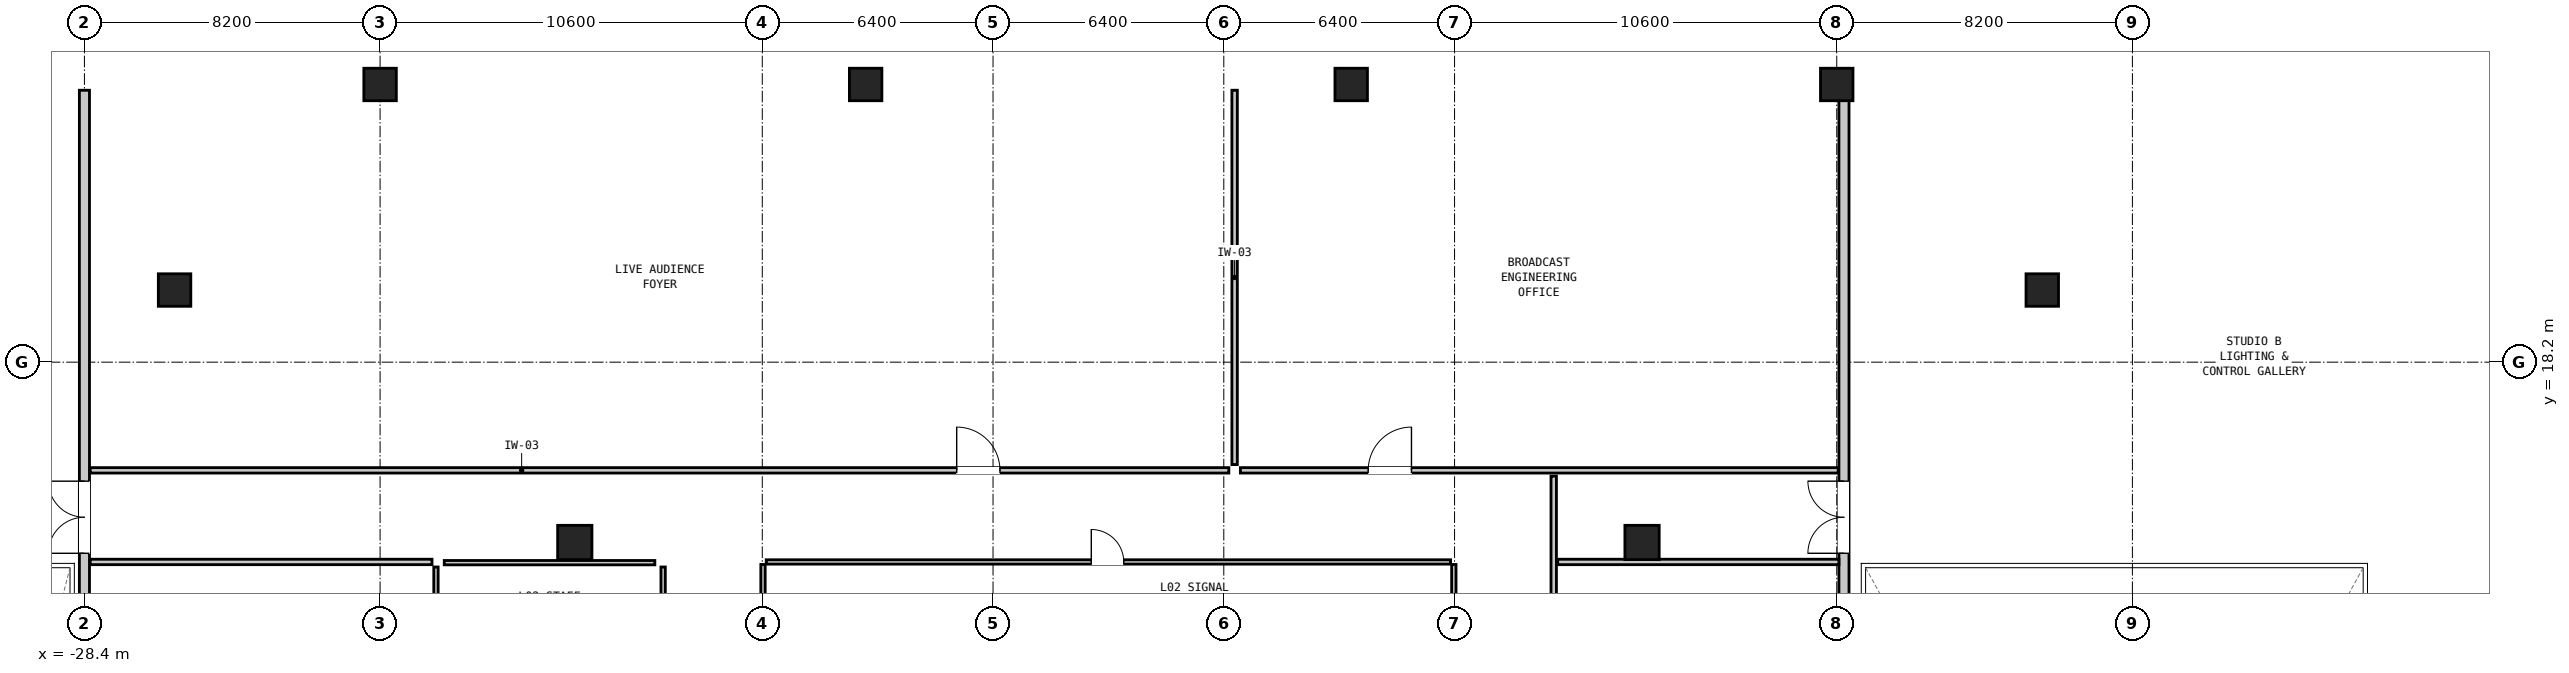
"""IFC4 building model, lengths in metres.
Left out: names, types, materials, properties, quantities, classifications, styles, units other than length and angle.
Written with IfcOpenShell. Run it as: python <this file> out.ifc"""

import sys

from ifc_helpers import new_model, si_unit, direction, frame, frame_2d, origin, origin_2d, place, context, subcontext, project, spatial, rectangle, hollow_rectangle, extrude, element, fill, save


model = new_model("IFC4")
c1 = context("Model", 3, precision=1e-05, world=origin(), true_north=direction((0.0, 1.0)))
c2 = subcontext(c1, "Body", "Model", "MODEL_VIEW")
j1 = project(units=[si_unit("LENGTHUNIT", "METRE"), si_unit("PLANEANGLEUNIT", "RADIAN")], contexts=[c1])
p1 = place(None, origin())
s1 = spatial("IfcSite", under=j1, at=p1, CompositionType="ELEMENT")
p2 = place(p1, origin())
s2 = spatial("IfcBuilding", under=s1, at=p2, CompositionType="ELEMENT")
p3 = place(p2, frame((0.0, 0.0, 9.3)))
s3 = spatial("IfcBuildingStorey", under=s2, at=p3, CompositionType="ELEMENT", Elevation=9.3)
for number, where, z_axis, x_axis in (
    (1, (-14.8, 13.2, 0.0), (0.0, 0.0, 1.0), (1.0, 0.0, 0.0)),
    (2, (14.8, 13.2, 0.0), (0.0, 0.0, 1.0), (1.0, 0.0, 0.0)),
):
    element("IfcColumn", number, at=place(p3, frame(where, z_axis=z_axis, x_axis=x_axis)), inside=s3, PredefinedType="COLUMN", context=c2, shape_type="SweptSolid", body=[
        extrude(hollow_rectangle(XDim=0.95, YDim=0.95, WallThickness=0.06, at=origin_2d()), origin(), (0.0, 0.0, 1.0), 4.2),
    ])
for number, where, z_axis, x_axis in (
    (3, (25.9, 20.2, 0.0), (0.0, 0.0, 1.0), (0.0, 1.0, 0.0)),
    (4, (20.2, 25.9, 0.0), (0.0, 0.0, 1.0), (1.0, 0.0, 0.0)),
    (5, (6.733, 25.9, 0.0), (0.0, 0.0, 1.0), (1.0, 0.0, 0.0)),
    (6, (-6.733, 25.9, 0.0), (0.0, 0.0, 1.0), (1.0, 0.0, 0.0)),
    (7, (-20.2, 25.9, 0.0), (0.0, 0.0, 1.0), (1.0, 0.0, 0.0)),
    (8, (-25.9, 20.2, 0.0), (0.0, 0.0, 1.0), (0.0, 1.0, 0.0)),
):
    element("IfcColumn", number, at=place(p3, frame(where, z_axis=z_axis, x_axis=x_axis)), inside=s3, PredefinedType="COLUMN", context=c2, shape_type="SweptSolid", body=[
        extrude(hollow_rectangle(XDim=0.9, YDim=0.9, WallThickness=0.055, at=origin_2d()), origin(), (0.0, 0.0, 1.0), 4.2),
    ])
p4 = place(p3, frame((-18.42, 12.64, 0.0), z_axis=(0.0, 0.0, 1.0), x_axis=(1.0, 0.0, 0.0)))
e9 = element("IfcWall", 9, at=p4, inside=s3, PredefinedType="PARTITIONING", context=c2, shape_type="SweptSolid", body=[
    extrude(rectangle(XDim=5.84, YDim=0.12, at=frame_2d((2.92, 0.0))), origin(), (0.0, 0.0, 1.0), 3.88),
])
p5 = place(p3, frame((-18.65, 6.91, 0.0), z_axis=(0.0, 0.0, 1.0), x_axis=(0.0, 1.0, 0.0)))
e10 = element("IfcWall", 10, at=p5, inside=s3, PredefinedType="PARTITIONING", context=c2, shape_type="SweptSolid", body=[
    extrude(rectangle(XDim=5.61, YDim=0.12, at=frame_2d((2.805, 0.0))), origin(), (0.0, 0.0, 1.0), 3.88),
])
p6 = place(p3, frame((-12.35, 6.91, 0.0), z_axis=(0.0, 0.0, 1.0), x_axis=(0.0, 1.0, 0.0)))
e11 = element("IfcWall", 11, at=p6, inside=s3, PredefinedType="PARTITIONING", context=c2, shape_type="SweptSolid", body=[
    extrude(rectangle(XDim=5.61, YDim=0.12, at=frame_2d((2.805, 0.0))), origin(), (0.0, 0.0, 1.0), 3.88),
])
p7 = place(p6, frame((0.759, 0.0, 0.0)))
e12 = element("IfcOpeningElement", 12, at=p7, cuts=e11, PredefinedType="OPENING", context=c2, shape_type="SweptSolid", body=[
    extrude(rectangle(XDim=0.95, YDim=2.1, at=frame_2d((0.475, 1.05))), frame((0.0, 0.072, 0.0), z_axis=(0.0, -1.0, 0.0), x_axis=(1.0, 0.0, 0.0)), (0.0, 0.0, 1.0), 0.144),
])
p8 = place(p6, frame((3.676, 0.0, 0.0)))
e13 = element("IfcOpeningElement", 13, at=p8, cuts=e11, PredefinedType="OPENING", context=c2, shape_type="SweptSolid", body=[
    extrude(rectangle(XDim=0.92, YDim=2.1, at=frame_2d((0.46, 1.05))), frame((0.0, 0.072, 0.0), z_axis=(0.0, -1.0, 0.0), x_axis=(1.0, 0.0, 0.0)), (0.0, 0.0, 1.0), 0.144),
])
p9 = place(p3, frame((-28.4, -25.74, 0.0), z_axis=(0.0, 0.0, 1.0), x_axis=(0.0, 1.0, 0.0)))
e14 = element("IfcWall", 14, at=p9, inside=s3, PredefinedType="MOVABLE", context=c2, shape_type="SweptSolid", body=[
    extrude(rectangle(XDim=51.48, YDim=0.28, at=frame_2d((25.74, 0.0))), origin(), (0.0, 0.0, 1.0), 3.88),
])
p10 = place(p9, frame((11.149, 0.0, 0.0)))
e15 = element("IfcOpeningElement", 15, at=p10, cuts=e14, PredefinedType="OPENING", context=c2, shape_type="SweptSolid", body=[
    extrude(rectangle(XDim=2.0, YDim=2.14, at=frame_2d((1.0, 1.07))), frame((0.0, 0.152, 0.0), z_axis=(0.0, -1.0, 0.0), x_axis=(1.0, 0.0, 0.0)), (0.0, 0.0, 1.0), 0.304),
])
p11 = place(p9, frame((38.64, 0.0, 0.0)))
e16 = element("IfcOpeningElement", 16, at=p11, cuts=e14, PredefinedType="OPENING", context=c2, shape_type="SweptSolid", body=[
    extrude(rectangle(XDim=2.0, YDim=2.14, at=frame_2d((1.0, 1.07))), frame((0.0, 0.152, 0.0), z_axis=(0.0, -1.0, 0.0), x_axis=(1.0, 0.0, 0.0)), (0.0, 0.0, 1.0), 0.304),
])
p12 = place(p3, frame((20.4, -25.74, 0.0), z_axis=(0.0, 0.0, 1.0), x_axis=(0.0, 1.0, 0.0)))
e17 = element("IfcWall", 17, at=p12, inside=s3, PredefinedType="MOVABLE", context=c2, shape_type="SweptSolid", body=[
    extrude(rectangle(XDim=51.48, YDim=0.28, at=frame_2d((25.74, 0.0))), origin(), (0.0, 0.0, 1.0), 2.933),
])
p13 = place(p12, frame((11.149, 0.0, 0.0)))
e18 = element("IfcOpeningElement", 18, at=p13, cuts=e17, PredefinedType="OPENING", context=c2, shape_type="SweptSolid", body=[
    extrude(rectangle(XDim=2.0, YDim=2.14, at=frame_2d((1.0, 1.07))), frame((0.0, 0.152, 0.0), z_axis=(0.0, -1.0, 0.0), x_axis=(1.0, 0.0, 0.0)), (0.0, 0.0, 1.0), 0.304),
])
p14 = place(p12, frame((38.64, 0.0, 0.0)))
e19 = element("IfcOpeningElement", 19, at=p14, cuts=e17, PredefinedType="OPENING", context=c2, shape_type="SweptSolid", body=[
    extrude(rectangle(XDim=2.0, YDim=2.14, at=frame_2d((1.0, 1.07))), frame((0.0, 0.152, 0.0), z_axis=(0.0, -1.0, 0.0), x_axis=(1.0, 0.0, 0.0)), (0.0, 0.0, 1.0), 0.304),
])
p15 = place(p3, frame((-28.24, 15.2, 0.0), z_axis=(0.0, 0.0, 1.0), x_axis=(1.0, 0.0, 0.0)))
e20 = element("IfcWall", 20, at=p15, inside=s3, PredefinedType="PARTITIONING", context=c2, shape_type="SweptSolid", body=[
    extrude(rectangle(XDim=31.58, YDim=0.15, at=frame_2d((15.79, 0.0))), origin(), (0.0, 0.0, 1.0), 3.88),
])
p16 = place(p15, frame((24.032, 0.0, 0.0)))
e21 = element("IfcOpeningElement", 21, at=p16, cuts=e20, PredefinedType="OPENING", context=c2, shape_type="SweptSolid", body=[
    extrude(rectangle(XDim=1.2, YDim=2.1, at=frame_2d((0.6, 1.05))), frame((0.0, 0.087, 0.0), z_axis=(0.0, -1.0, 0.0), x_axis=(1.0, 0.0, 0.0)), (0.0, 0.0, 1.0), 0.174),
])
p17 = place(p3, frame((3.66, 15.2, 0.0), z_axis=(0.0, 0.0, 1.0), x_axis=(1.0, 0.0, 0.0)))
e22 = element("IfcWall", 22, at=p17, inside=s3, PredefinedType="PARTITIONING", context=c2, shape_type="SweptSolid", body=[
    extrude(rectangle(XDim=16.58, YDim=0.15, at=frame_2d((8.29, 0.0))), origin(), (0.0, 0.0, 1.0), 3.88),
])
p18 = place(p17, frame((3.545, 0.0, 0.0)))
e23 = element("IfcOpeningElement", 23, at=p18, cuts=e22, PredefinedType="OPENING", context=c2, shape_type="SweptSolid", body=[
    extrude(rectangle(XDim=1.2, YDim=2.1, at=frame_2d((0.6, 1.05))), frame((0.0, 0.087, 0.0), z_axis=(0.0, -1.0, 0.0), x_axis=(1.0, 0.0, 0.0)), (0.0, 0.0, 1.0), 0.174),
])
p19 = place(p3, frame((3.5, 15.36, 0.0), z_axis=(0.0, 0.0, 1.0), x_axis=(0.0, 1.0, 0.0)))
e24 = element("IfcWall", 24, at=p19, inside=s3, PredefinedType="PARTITIONING", context=c2, shape_type="SweptSolid", body=[
    extrude(rectangle(XDim=10.38, YDim=0.15, at=frame_2d((5.19, 0.0))), origin(), (0.0, 0.0, 1.0), 3.88),
])
p20 = place(p3, frame((12.35, 3.74, 0.0), z_axis=(0.0, 0.0, 1.0), x_axis=(0.0, 1.0, 0.0)))
e25 = element("IfcWall", 25, at=p20, inside=s3, PredefinedType="PARTITIONING", context=c2, shape_type="SweptSolid", body=[
    extrude(rectangle(XDim=11.3, YDim=0.15, at=frame_2d((5.65, 0.0))), origin(), (0.0, 0.0, 1.0), 3.88),
])
p21 = place(p20, frame((5.175, 0.0, 0.0)))
e26 = element("IfcOpeningElement", 26, at=p21, cuts=e25, PredefinedType="OPENING", context=c2, shape_type="SweptSolid", body=[
    extrude(rectangle(XDim=0.95, YDim=2.1, at=frame_2d((0.475, 1.05))), frame((0.0, 0.087, 0.0), z_axis=(0.0, -1.0, 0.0), x_axis=(1.0, 0.0, 0.0)), (0.0, 0.0, 1.0), 0.174),
])
p22 = place(p3, frame((-9.49, 12.66, 0.0), z_axis=(0.0, 0.0, 1.0), x_axis=(1.0, 0.0, 0.0)))
e27 = element("IfcWall", 27, at=p22, inside=s3, PredefinedType="PARTITIONING", context=c2, shape_type="SweptSolid", body=[
    extrude(rectangle(XDim=18.98, YDim=0.12, at=frame_2d((9.49, 0.0))), origin(), (0.0, 0.0, 1.0), 3.88),
])
p23 = place(p22, frame((9.015, 0.0, 0.0)))
e28 = element("IfcOpeningElement", 28, at=p23, cuts=e27, PredefinedType="OPENING", context=c2, shape_type="SweptSolid", body=[
    extrude(rectangle(XDim=0.9, YDim=2.05, at=frame_2d((0.45, 1.025))), frame((0.0, 0.072, 0.0), z_axis=(0.0, -1.0, 0.0), x_axis=(1.0, 0.0, 0.0)), (0.0, 0.0, 1.0), 0.144),
])
for number, where, z_axis, x_axis in (
    (29, (-9.58, 10.31, 0.0), (0.0, 0.0, 1.0), (0.0, 1.0, 0.0)),
    (30, (9.58, 10.31, 0.0), (0.0, 0.0, 1.0), (0.0, 1.0, 0.0)),
):
    element("IfcWall", number, at=place(p3, frame(where, z_axis=z_axis, x_axis=x_axis)), inside=s3, PredefinedType="PARTITIONING", context=c2, shape_type="SweptSolid", body=[
        extrude(rectangle(XDim=2.28, YDim=0.12, at=frame_2d((1.14, 0.0))), origin(), (0.0, 0.0, 1.0), 3.88),
    ])
p24 = place(p3, frame((-28.24, 12.66, 0.0), z_axis=(0.0, 0.0, 1.0), x_axis=(1.0, 0.0, 0.0)))
e31 = element("IfcWall", 31, at=p24, inside=s3, PredefinedType="PARTITIONING", context=c2, shape_type="SweptSolid", body=[
    extrude(rectangle(XDim=9.48, YDim=0.15, at=frame_2d((4.74, 0.0))), origin(), (0.0, 0.0, 1.0), 3.88),
])
p25 = place(p3, frame((12.46, 12.66, 0.0), z_axis=(0.0, 0.0, 1.0), x_axis=(1.0, 0.0, 0.0)))
e32 = element("IfcWall", 32, at=p25, inside=s3, PredefinedType="PARTITIONING", context=c2, shape_type="SweptSolid", body=[
    extrude(rectangle(XDim=7.8, YDim=0.15, at=frame_2d((3.9, 0.0))), origin(), (0.0, 0.0, 1.0), 3.88),
])
p26 = place(p11, origin())
e33 = element("IfcDoor", 33, at=p26, inside=s3, OperationType="DOUBLE_DOOR_SINGLE_SWING", PredefinedType="DOOR", context=c2, shape_type="SweptSolid", body=[
    extrude(rectangle(XDim=2.0, YDim=2.14, at=frame_2d((1.0, 1.07))), frame((0.0, 0.025, 0.0), z_axis=(0.0, -1.0, 0.0), x_axis=(1.0, 0.0, 0.0)), (0.0, 0.0, 1.0), 0.05),
])
fill(e16, e33)
p27 = place(p14, origin())
e34 = element("IfcDoor", 34, at=p27, inside=s3, OperationType="DOUBLE_DOOR_SINGLE_SWING", PredefinedType="DOOR", context=c2, shape_type="SweptSolid", body=[
    extrude(rectangle(XDim=2.0, YDim=2.14, at=frame_2d((1.0, 1.07))), frame((0.0, 0.025, 0.0), z_axis=(0.0, -1.0, 0.0), x_axis=(1.0, 0.0, 0.0)), (0.0, 0.0, 1.0), 0.05),
])
fill(e19, e34)
p28 = place(p16, origin())
e35 = element("IfcDoor", 35, at=p28, inside=s3, OperationType="SINGLE_SWING_LEFT", PredefinedType="DOOR", context=c2, shape_type="SweptSolid", body=[
    extrude(rectangle(XDim=1.2, YDim=2.1, at=frame_2d((0.6, 1.05))), frame((0.0, 0.025, 0.0), z_axis=(0.0, -1.0, 0.0), x_axis=(1.0, 0.0, 0.0)), (0.0, 0.0, 1.0), 0.05),
])
fill(e21, e35)
p29 = place(p18, origin())
e36 = element("IfcDoor", 36, at=p29, inside=s3, OperationType="SINGLE_SWING_RIGHT", PredefinedType="DOOR", context=c2, shape_type="SweptSolid", body=[
    extrude(rectangle(XDim=1.2, YDim=2.1, at=frame_2d((0.6, 1.05))), frame((0.0, 0.025, 0.0), z_axis=(0.0, -1.0, 0.0), x_axis=(1.0, 0.0, 0.0)), (0.0, 0.0, 1.0), 0.05),
])
fill(e23, e36)
p30 = place(p23, origin())
e37 = element("IfcDoor", 37, at=p30, inside=s3, OperationType="SINGLE_SWING_LEFT", PredefinedType="DOOR", context=c2, shape_type="SweptSolid", body=[
    extrude(rectangle(XDim=0.9, YDim=2.05, at=frame_2d((0.45, 1.025))), frame((0.0, 0.025, 0.0), z_axis=(0.0, -1.0, 0.0), x_axis=(1.0, 0.0, 0.0)), (0.0, 0.0, 1.0), 0.05),
])
fill(e28, e37)
save(model, sys.argv[1])
